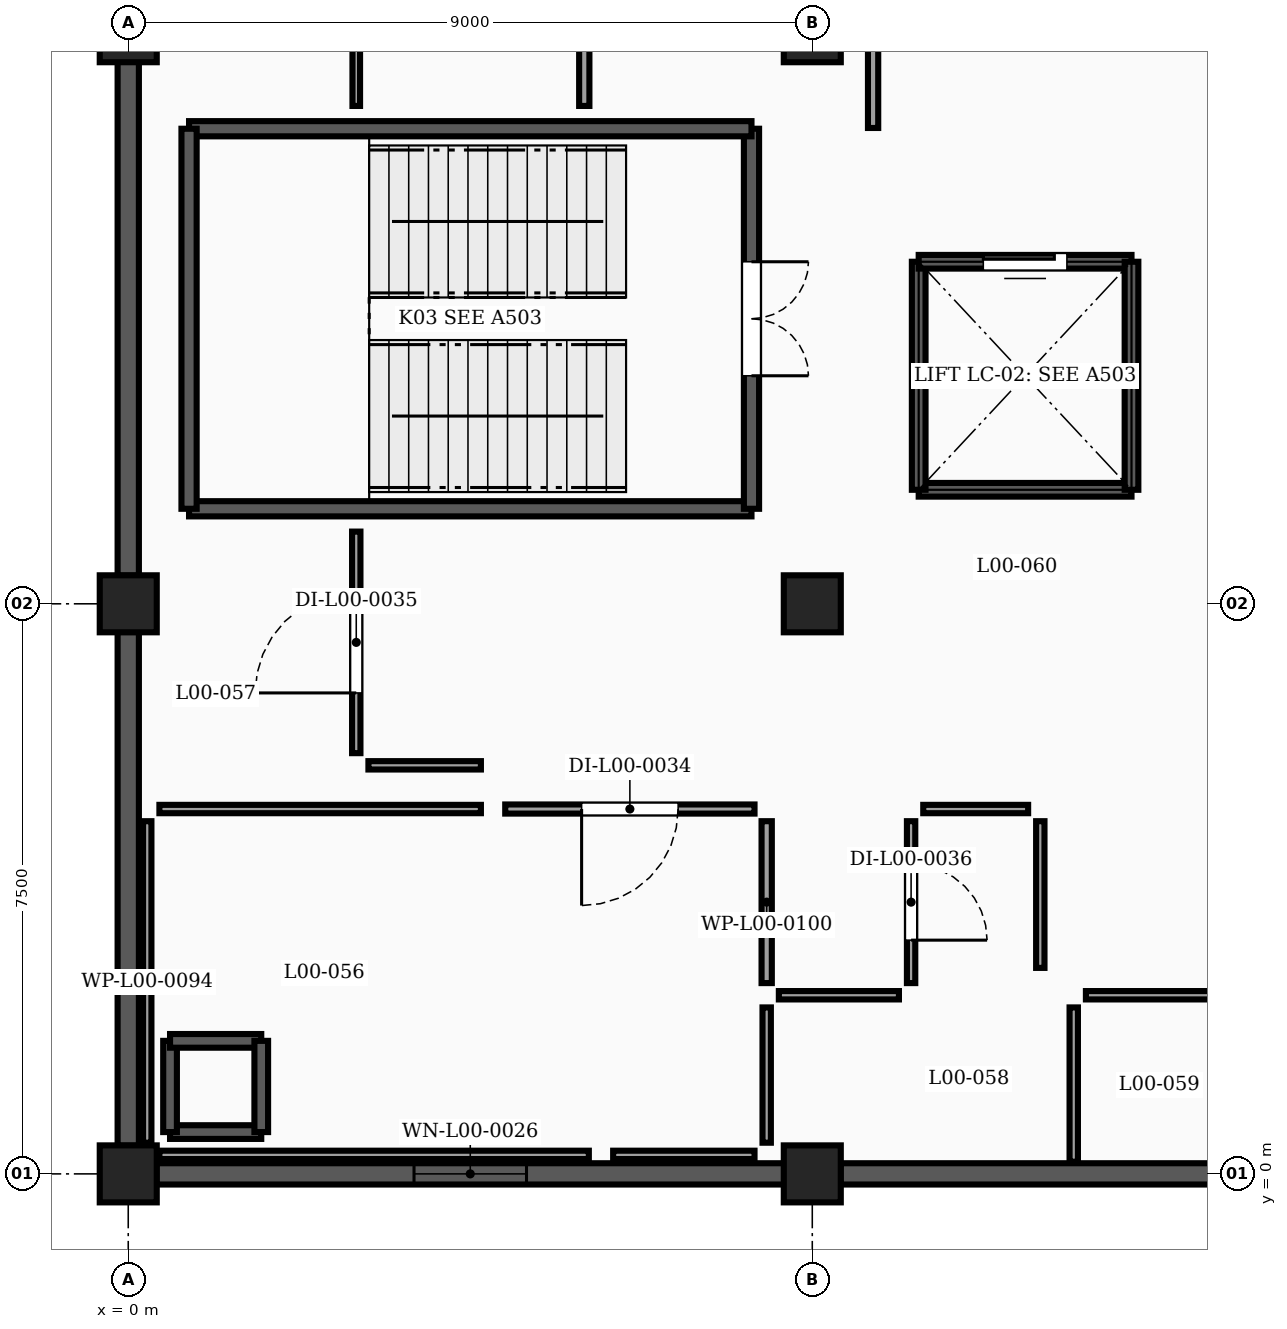
"""IFC4 building model, lengths in metres.
Left out: names, types, materials, properties, quantities, classifications, styles, units other than length and angle.
Written with IfcOpenShell. Run it as: python <this file> out.ifc"""

import sys

from ifc_helpers import new_model, si_unit, direction, frame, frame_2d, origin, origin_2d, place, context, subcontext, project, spatial, rectangle, extrude, element, fill, save


model = new_model("IFC4")
c1 = context("Model", 3, precision=1e-05, world=origin(), true_north=direction((0.0, 1.0)))
c2 = subcontext(c1, "Body", "Model", "MODEL_VIEW")
j1 = project(units=[si_unit("LENGTHUNIT", "METRE"), si_unit("PLANEANGLEUNIT", "RADIAN")], contexts=[c1])
p1 = place(None, origin())
s1 = spatial("IfcSite", under=j1, at=p1, CompositionType="ELEMENT")
p2 = place(p1, origin())
s2 = spatial("IfcBuilding", under=s1, at=p2, CompositionType="ELEMENT")
p3 = place(p2, origin())
s3 = spatial("IfcBuildingStorey", under=s2, at=p3, CompositionType="ELEMENT", Elevation=0.0)
for number, where, z_axis, x_axis in (
    (1, (0.0, 0.0, -0.25), (0.0, 0.0, 1.0), (1.0, 0.0, 0.0)),
    (2, (9.0, 0.0, -0.25), (0.0, 0.0, 1.0), (1.0, 0.0, 0.0)),
    (3, (0.0, 7.5, -0.25), (0.0, 0.0, 1.0), (1.0, 0.0, 0.0)),
    (4, (9.0, 7.5, -0.25), (0.0, 0.0, 1.0), (1.0, 0.0, 0.0)),
    (5, (0.0, 15.0, -0.25), (0.0, 0.0, 1.0), (1.0, 0.0, 0.0)),
    (6, (9.0, 15.0, -0.25), (0.0, 0.0, 1.0), (1.0, 0.0, 0.0)),
):
    element("IfcColumn", number, at=place(p3, frame(where, z_axis=z_axis, x_axis=x_axis)), inside=s3, PredefinedType="COLUMN", context=c2, shape_type="SweptSolid", body=[
        extrude(rectangle(XDim=0.75, YDim=0.75, at=origin_2d()), origin(), (0.0, 0.0, 1.0), 4.75),
    ])
p4 = place(p3, frame((17.629, 0.0, 0.0), z_axis=(0.0, 0.0, 1.0), x_axis=(-1.0, 0.0, 0.0)))
e7 = element("IfcWall", 7, at=p4, inside=s3, PredefinedType="SOLIDWALL", context=c2, shape_type="SweptSolid", body=[
    extrude(rectangle(XDim=8.258, YDim=0.28, at=frame_2d((4.129, 0.0))), origin(), (0.0, 0.0, 1.0), 3.332),
])
p5 = place(p3, frame((8.629, 0.0, 0.0), z_axis=(0.0, 0.0, 1.0), x_axis=(-1.0, 0.0, 0.0)))
e8 = element("IfcWall", 8, at=p5, inside=s3, PredefinedType="SOLIDWALL", context=c2, shape_type="SweptSolid", body=[
    extrude(rectangle(XDim=8.258, YDim=0.28, at=frame_2d((4.129, 0.0))), origin(), (0.0, 0.0, 1.0), 3.332),
])
p6 = place(p5, frame((3.389, 0.0, 0.95)))
e9 = element("IfcOpeningElement", 9, at=p6, cuts=e8, PredefinedType="OPENING", context=c2, shape_type="SweptSolid", body=[
    extrude(rectangle(XDim=1.48, YDim=1.52, at=frame_2d((0.74, 0.76))), frame((0.0, 0.15, 0.0), z_axis=(0.0, -1.0, 0.0), x_axis=(1.0, 0.0, 0.0)), (0.0, 0.0, 1.0), 0.3),
])
for number, where, z_axis, x_axis in (
    (10, (0.0, 0.371, 0.0), (0.0, 0.0, 1.0), (0.0, 1.0, 0.0)),
    (11, (0.0, 7.871, 0.0), (0.0, 0.0, 1.0), (0.0, 1.0, 0.0)),
):
    element("IfcWall", number, at=place(p3, frame(where, z_axis=z_axis, x_axis=x_axis)), inside=s3, PredefinedType="SOLIDWALL", context=c2, shape_type="SweptSolid", body=[
        extrude(rectangle(XDim=6.758, YDim=0.28, at=frame_2d((3.379, 0.0))), origin(), (0.0, 0.0, 1.0), 3.332),
    ])
for number, where, z_axis, x_axis in (
    (12, (1.75, 0.55, 0.0), (0.0, 0.0, 1.0), (-1.0, 0.0, 0.0)),
    (13, (0.55, 0.55, 0.0), (0.0, 0.0, 1.0), (0.0, 1.0, 0.0)),
    (14, (0.55, 1.75, 0.0), (0.0, 0.0, 1.0), (1.0, 0.0, 0.0)),
    (15, (1.75, 1.75, 0.0), (0.0, 0.0, 1.0), (0.0, -1.0, 0.0)),
):
    element("IfcWall", number, at=place(p3, frame(where, z_axis=z_axis, x_axis=x_axis)), inside=s3, PredefinedType="SHEAR", context=c2, shape_type="SweptSolid", body=[
        extrude(rectangle(XDim=1.2, YDim=0.18, at=frame_2d((0.6, 0.0))), origin(), (0.0, 0.0, 1.0), 4.09),
    ])
p7 = place(p3, frame((0.8, 8.75, 0.0), z_axis=(0.0, 0.0, 1.0), x_axis=(1.0, 0.0, 0.0)))
e16 = element("IfcWall", 16, at=p7, inside=s3, PredefinedType="SHEAR", context=c2, shape_type="SweptSolid", body=[
    extrude(rectangle(XDim=7.4, YDim=0.2, at=frame_2d((3.7, 0.0))), origin(), (0.0, 0.0, 1.0), 4.09),
])
p8 = place(p3, frame((8.2, 13.75, 0.0), z_axis=(0.0, 0.0, 1.0), x_axis=(0.0, -1.0, 0.0)))
e17 = element("IfcWall", 17, at=p8, inside=s3, PredefinedType="SHEAR", context=c2, shape_type="SweptSolid", body=[
    extrude(rectangle(XDim=5.0, YDim=0.2, at=frame_2d((2.5, 0.0))), origin(), (0.0, 0.0, 1.0), 4.09),
])
p9 = place(p8, frame((1.75, 0.0, 0.0)))
e18 = element("IfcOpeningElement", 18, at=p9, cuts=e17, PredefinedType="OPENING", context=c2, shape_type="SweptSolid", body=[
    extrude(rectangle(XDim=1.5, YDim=2.15, at=frame_2d((0.75, 1.075))), frame((0.0, 0.11, 0.0), z_axis=(0.0, -1.0, 0.0), x_axis=(1.0, 0.0, 0.0)), (0.0, 0.0, 1.0), 0.22),
])
p10 = place(p3, frame((8.2, 13.75, 0.0), z_axis=(0.0, 0.0, 1.0), x_axis=(-1.0, 0.0, 0.0)))
e19 = element("IfcWall", 19, at=p10, inside=s3, PredefinedType="SHEAR", context=c2, shape_type="SweptSolid", body=[
    extrude(rectangle(XDim=7.4, YDim=0.2, at=frame_2d((3.7, 0.0))), origin(), (0.0, 0.0, 1.0), 4.09),
])
p11 = place(p3, frame((0.8, 13.75, 0.0), z_axis=(0.0, 0.0, 1.0), x_axis=(0.0, -1.0, 0.0)))
e20 = element("IfcWall", 20, at=p11, inside=s3, PredefinedType="SHEAR", context=c2, shape_type="SweptSolid", body=[
    extrude(rectangle(XDim=5.0, YDim=0.2, at=frame_2d((2.5, 0.0))), origin(), (0.0, 0.0, 1.0), 4.09),
])
p12 = place(p3, frame((13.2, 9.0, -0.2), z_axis=(0.0, 0.0, 1.0), x_axis=(-1.0, 0.0, 0.0)))
e21 = element("IfcWall", 21, at=p12, inside=s3, PredefinedType="SHEAR", context=c2, shape_type="SweptSolid", body=[
    extrude(rectangle(XDim=2.8, YDim=0.18, at=frame_2d((1.4, 0.0))), origin(), (0.0, 0.0, 1.0), 4.29),
])
p13 = place(p3, frame((10.4, 9.0, -0.2), z_axis=(0.0, 0.0, 1.0), x_axis=(0.0, 1.0, 0.0)))
e22 = element("IfcWall", 22, at=p13, inside=s3, PredefinedType="SHEAR", context=c2, shape_type="SweptSolid", body=[
    extrude(rectangle(XDim=3.0, YDim=0.18, at=frame_2d((1.5, 0.0))), origin(), (0.0, 0.0, 1.0), 4.29),
])
p14 = place(p3, frame((10.4, 12.0, -0.2), z_axis=(0.0, 0.0, 1.0), x_axis=(1.0, 0.0, 0.0)))
e23 = element("IfcWall", 23, at=p14, inside=s3, PredefinedType="SHEAR", context=c2, shape_type="SweptSolid", body=[
    extrude(rectangle(XDim=2.8, YDim=0.18, at=frame_2d((1.4, 0.0))), origin(), (0.0, 0.0, 1.0), 4.29),
])
p15 = place(p14, frame((0.85, 0.0, 0.2)))
e24 = element("IfcOpeningElement", 24, at=p15, cuts=e23, PredefinedType="OPENING", context=c2, shape_type="SweptSolid", body=[
    extrude(rectangle(XDim=1.1, YDim=2.15, at=frame_2d((0.55, 1.075))), frame((0.0, 0.1, 0.0), z_axis=(0.0, -1.0, 0.0), x_axis=(1.0, 0.0, 0.0)), (0.0, 0.0, 1.0), 0.2),
])
p16 = place(p3, frame((13.2, 12.0, -0.2), z_axis=(0.0, 0.0, 1.0), x_axis=(0.0, -1.0, 0.0)))
e25 = element("IfcWall", 25, at=p16, inside=s3, PredefinedType="SHEAR", context=c2, shape_type="SweptSolid", body=[
    extrude(rectangle(XDim=3.0, YDim=0.18, at=frame_2d((1.5, 0.0))), origin(), (0.0, 0.0, 1.0), 4.29),
])
p17 = place(p3, frame((0.25, 4.64, 0.0), z_axis=(0.0, 0.0, 1.0), x_axis=(0.0, -1.0, 0.0)))
e26 = element("IfcWall", 26, at=p17, inside=s3, PredefinedType="PARTITIONING", context=c2, shape_type="SweptSolid", body=[
    extrude(rectangle(XDim=4.23, YDim=0.11, at=frame_2d((2.115, 0.0))), origin(), (0.0, 0.0, 1.0), 3.332),
])
p18 = place(p3, frame((4.64, 4.8, 0.0), z_axis=(0.0, 0.0, 1.0), x_axis=(-1.0, 0.0, 0.0)))
e27 = element("IfcWall", 27, at=p18, inside=s3, PredefinedType="PARTITIONING", context=c2, shape_type="SweptSolid", body=[
    extrude(rectangle(XDim=4.23, YDim=0.11, at=frame_2d((2.115, 0.0))), origin(), (0.0, 0.0, 1.0), 4.09),
])
p19 = place(p3, frame((0.41, 0.25, 0.0), z_axis=(0.0, 0.0, 1.0), x_axis=(1.0, 0.0, 0.0)))
e28 = element("IfcWall", 28, at=p19, inside=s3, PredefinedType="PARTITIONING", context=c2, shape_type="SweptSolid", body=[
    extrude(rectangle(XDim=5.65, YDim=0.11, at=frame_2d((2.825, 0.0))), origin(), (0.0, 0.0, 1.0), 3.332),
])
p20 = place(p3, frame((8.4, 0.41, 0.0), z_axis=(0.0, 0.0, 1.0), x_axis=(0.0, 1.0, 0.0)))
e29 = element("IfcWall", 29, at=p20, inside=s3, PredefinedType="PARTITIONING", context=c2, shape_type="SweptSolid", body=[
    extrude(rectangle(XDim=1.78, YDim=0.11, at=frame_2d((0.89, 0.0))), origin(), (0.0, 0.0, 1.0), 4.09),
])
p21 = place(p3, frame((6.38, 0.25, 0.0), z_axis=(0.0, 0.0, 1.0), x_axis=(1.0, 0.0, 0.0)))
e30 = element("IfcWall", 30, at=p21, inside=s3, PredefinedType="PARTITIONING", context=c2, shape_type="SweptSolid", body=[
    extrude(rectangle(XDim=1.86, YDim=0.11, at=frame_2d((0.93, 0.0))), origin(), (0.0, 0.0, 1.0), 3.332),
])
p22 = place(p3, frame((8.24, 4.8, 0.0), z_axis=(0.0, 0.0, 1.0), x_axis=(-1.0, 0.0, 0.0)))
e31 = element("IfcWall", 31, at=p22, inside=s3, PredefinedType="PARTITIONING", context=c2, shape_type="SweptSolid", body=[
    extrude(rectangle(XDim=3.28, YDim=0.12, at=frame_2d((1.64, 0.0))), origin(), (0.0, 0.0, 1.0), 4.09),
])
p23 = place(p22, frame((1.005, 0.0, 0.0)))
e32 = element("IfcOpeningElement", 32, at=p23, cuts=e31, PredefinedType="OPENING", context=c2, shape_type="SweptSolid", body=[
    extrude(rectangle(XDim=1.27, YDim=2.16, at=frame_2d((0.635, 1.08))), frame((0.0, 0.07, 0.0), z_axis=(0.0, -1.0, 0.0), x_axis=(1.0, 0.0, 0.0)), (0.0, 0.0, 1.0), 0.14),
])
p24 = place(p3, frame((8.4, 2.51, 0.0), z_axis=(0.0, 0.0, 1.0), x_axis=(0.0, 1.0, 0.0)))
e33 = element("IfcWall", 33, at=p24, inside=s3, PredefinedType="PARTITIONING", context=c2, shape_type="SweptSolid", body=[
    extrude(rectangle(XDim=2.13, YDim=0.135, at=frame_2d((1.065, 0.0))), origin(), (0.0, 0.0, 1.0), 4.09),
])
p25 = place(p3, frame((3.0, 5.535, 0.0), z_axis=(0.0, 0.0, 1.0), x_axis=(0.0, 1.0, 0.0)))
e34 = element("IfcWall", 34, at=p25, inside=s3, PredefinedType="PARTITIONING", context=c2, shape_type="SweptSolid", body=[
    extrude(rectangle(XDim=2.915, YDim=0.11, at=frame_2d((1.458, 0.0))), origin(), (0.0, 0.0, 1.0), 3.775),
])
p26 = place(p25, frame((0.792, 0.0, 0.0)))
e35 = element("IfcOpeningElement", 35, at=p26, cuts=e34, PredefinedType="OPENING", context=c2, shape_type="SweptSolid", body=[
    extrude(rectangle(XDim=1.33, YDim=2.18, at=frame_2d((0.665, 1.09))), frame((0.0, 0.065, 0.0), z_axis=(0.0, -1.0, 0.0), x_axis=(1.0, 0.0, 0.0)), (0.0, 0.0, 1.0), 0.13),
])
p27 = place(p3, frame((4.64, 5.375, 0.0), z_axis=(0.0, 0.0, 1.0), x_axis=(-1.0, 0.0, 0.0)))
e36 = element("IfcWall", 36, at=p27, inside=s3, PredefinedType="PARTITIONING", context=c2, shape_type="SweptSolid", body=[
    extrude(rectangle(XDim=1.48, YDim=0.11, at=frame_2d((0.74, 0.0))), origin(), (0.0, 0.0, 1.0), 4.09),
])
p28 = place(p3, frame((12.44, 0.16, 0.0), z_axis=(0.0, 0.0, 1.0), x_axis=(0.0, 1.0, 0.0)))
e37 = element("IfcWall", 37, at=p28, inside=s3, PredefinedType="PARTITIONING", context=c2, shape_type="SweptSolid", body=[
    extrude(rectangle(XDim=2.03, YDim=0.11, at=frame_2d((1.015, 0.0))), origin(), (0.0, 0.0, 1.0), 4.09),
])
p29 = place(p3, frame((10.14, 2.35, 0.0), z_axis=(0.0, 0.0, 1.0), x_axis=(-1.0, 0.0, 0.0)))
e38 = element("IfcWall", 38, at=p29, inside=s3, PredefinedType="PARTITIONING", context=c2, shape_type="SweptSolid", body=[
    extrude(rectangle(XDim=1.58, YDim=0.11, at=frame_2d((0.79, 0.0))), origin(), (0.0, 0.0, 1.0), 4.09),
])
p30 = place(p3, frame((10.3, 4.64, 0.0), z_axis=(0.0, 0.0, 1.0), x_axis=(0.0, -1.0, 0.0)))
e39 = element("IfcWall", 39, at=p30, inside=s3, PredefinedType="PARTITIONING", context=c2, shape_type="SweptSolid", body=[
    extrude(rectangle(XDim=2.13, YDim=0.11, at=frame_2d((1.065, 0.0))), origin(), (0.0, 0.0, 1.0), 4.09),
])
p31 = place(p30, frame((0.565, 0.0, 0.0)))
e40 = element("IfcOpeningElement", 40, at=p31, cuts=e39, PredefinedType="OPENING", context=c2, shape_type="SweptSolid", body=[
    extrude(rectangle(XDim=1.0, YDim=2.15, at=frame_2d((0.5, 1.075))), frame((0.0, 0.065, 0.0), z_axis=(0.0, -1.0, 0.0), x_axis=(1.0, 0.0, 0.0)), (0.0, 0.0, 1.0), 0.13),
])
p32 = place(p3, frame((11.84, 4.8, 0.0), z_axis=(0.0, 0.0, 1.0), x_axis=(-1.0, 0.0, 0.0)))
e41 = element("IfcWall", 41, at=p32, inside=s3, PredefinedType="PARTITIONING", context=c2, shape_type="SweptSolid", body=[
    extrude(rectangle(XDim=1.38, YDim=0.11, at=frame_2d((0.69, 0.0))), origin(), (0.0, 0.0, 1.0), 4.09),
])
p33 = place(p3, frame((12.0, 2.71, 0.0), z_axis=(0.0, 0.0, 1.0), x_axis=(0.0, 1.0, 0.0)))
e42 = element("IfcWall", 42, at=p33, inside=s3, PredefinedType="PARTITIONING", context=c2, shape_type="SweptSolid", body=[
    extrude(rectangle(XDim=1.93, YDim=0.11, at=frame_2d((0.965, 0.0))), origin(), (0.0, 0.0, 1.0), 3.775),
])
p34 = place(p3, frame((14.44, 2.35, 0.0), z_axis=(0.0, 0.0, 1.0), x_axis=(-1.0, 0.0, 0.0)))
e43 = element("IfcWall", 43, at=p34, inside=s3, PredefinedType="PARTITIONING", context=c2, shape_type="SweptSolid", body=[
    extrude(rectangle(XDim=1.84, YDim=0.11, at=frame_2d((0.92, 0.0))), origin(), (0.0, 0.0, 1.0), 4.09),
])
p35 = place(p3, frame((9.8, 13.76, 0.0), z_axis=(0.0, 0.0, 1.0), x_axis=(0.0, 1.0, 0.0)))
e44 = element("IfcWall", 44, at=p35, inside=s3, PredefinedType="PARTITIONING", context=c2, shape_type="SweptSolid", body=[
    extrude(rectangle(XDim=10.83, YDim=0.135, at=frame_2d((5.415, 0.0))), origin(), (0.0, 0.0, 1.0), 4.09),
])
p36 = place(p35, frame((4.625, 0.0, 0.0)))
e45 = element("IfcOpeningElement", 45, at=p36, cuts=e44, PredefinedType="OPENING", context=c2, shape_type="SweptSolid", body=[
    extrude(rectangle(XDim=1.58, YDim=2.2, at=frame_2d((0.79, 1.1))), frame((0.0, 0.077, 0.0), z_axis=(0.0, -1.0, 0.0), x_axis=(1.0, 0.0, 0.0)), (0.0, 0.0, 1.0), 0.155),
])
p37 = place(p3, frame((6.0, 24.59, 0.0), z_axis=(0.0, 0.0, 1.0), x_axis=(0.0, -1.0, 0.0)))
e46 = element("IfcWall", 46, at=p37, inside=s3, PredefinedType="PARTITIONING", context=c2, shape_type="SweptSolid", body=[
    extrude(rectangle(XDim=10.54, YDim=0.135, at=frame_2d((5.27, 0.0))), origin(), (0.0, 0.0, 1.0), 3.775),
])
p38 = place(p3, frame((3.0, 14.05, 0.0), z_axis=(0.0, 0.0, 1.0), x_axis=(0.0, 1.0, 0.0)))
e47 = element("IfcWall", 47, at=p38, inside=s3, PredefinedType="PARTITIONING", context=c2, shape_type="SweptSolid", body=[
    extrude(rectangle(XDim=10.54, YDim=0.1, at=frame_2d((5.27, 0.0))), origin(), (0.0, 0.0, 1.0), 3.775),
])
p39 = place(p38, frame((4.45, 0.0, 0.0)))
e48 = element("IfcOpeningElement", 48, at=p39, cuts=e47, PredefinedType="OPENING", context=c2, shape_type="SweptSolid", body=[
    extrude(rectangle(XDim=1.64, YDim=2.2, at=frame_2d((0.82, 1.1))), frame((0.0, 0.06, 0.0), z_axis=(0.0, -1.0, 0.0), x_axis=(1.0, 0.0, 0.0)), (0.0, 0.0, 1.0), 0.12),
])
p40 = place(p6, origin())
e49 = element("IfcWindow", 49, at=p40, inside=s3, PartitioningType="DOUBLE_PANEL_VERTICAL", PredefinedType="WINDOW", context=c2, shape_type="SweptSolid", body=[
    extrude(rectangle(XDim=1.48, YDim=1.52, at=frame_2d((0.74, 0.76))), frame((0.0, 0.03, 0.0), z_axis=(0.0, -1.0, 0.0), x_axis=(1.0, 0.0, 0.0)), (0.0, 0.0, 1.0), 0.06),
])
fill(e9, e49)
p41 = place(p9, origin())
e50 = element("IfcDoor", 50, at=p41, inside=s3, OperationType="DOUBLE_DOOR_SINGLE_SWING", PredefinedType="DOOR", context=c2, shape_type="SweptSolid", body=[
    extrude(rectangle(XDim=1.5, YDim=2.15, at=frame_2d((0.75, 1.075))), frame((0.0, 0.025, 0.0), z_axis=(0.0, -1.0, 0.0), x_axis=(1.0, 0.0, 0.0)), (0.0, 0.0, 1.0), 0.05),
])
fill(e18, e50)
p42 = place(p15, origin())
e51 = element("IfcDoor", 51, at=p42, inside=s3, OperationType="SLIDING_TO_LEFT", PredefinedType="DOOR", context=c2, shape_type="SweptSolid", body=[
    extrude(rectangle(XDim=1.1, YDim=2.15, at=frame_2d((0.55, 1.075))), frame((0.0, 0.025, 0.0), z_axis=(0.0, -1.0, 0.0), x_axis=(1.0, 0.0, 0.0)), (0.0, 0.0, 1.0), 0.05),
])
fill(e24, e51)
p43 = place(p23, origin())
e52 = element("IfcDoor", 52, at=p43, inside=s3, OperationType="SINGLE_SWING_RIGHT", PredefinedType="DOOR", context=c2, shape_type="SweptSolid", body=[
    extrude(rectangle(XDim=1.27, YDim=2.16, at=frame_2d((0.635, 1.08))), frame((0.0, 0.025, 0.0), z_axis=(0.0, -1.0, 0.0), x_axis=(1.0, 0.0, 0.0)), (0.0, 0.0, 1.0), 0.05),
])
fill(e32, e52)
p44 = place(p26, origin())
e53 = element("IfcDoor", 53, at=p44, inside=s3, OperationType="SINGLE_SWING_LEFT", PredefinedType="DOOR", context=c2, shape_type="SweptSolid", body=[
    extrude(rectangle(XDim=1.33, YDim=2.18, at=frame_2d((0.665, 1.09))), frame((0.0, 0.025, 0.0), z_axis=(0.0, -1.0, 0.0), x_axis=(1.0, 0.0, 0.0)), (0.0, 0.0, 1.0), 0.05),
])
fill(e35, e53)
p45 = place(p31, origin())
e54 = element("IfcDoor", 54, at=p45, inside=s3, OperationType="SINGLE_SWING_RIGHT", PredefinedType="DOOR", context=c2, shape_type="SweptSolid", body=[
    extrude(rectangle(XDim=1.0, YDim=2.15, at=frame_2d((0.5, 1.075))), frame((0.0, 0.025, 0.0), z_axis=(0.0, -1.0, 0.0), x_axis=(1.0, 0.0, 0.0)), (0.0, 0.0, 1.0), 0.05),
])
fill(e40, e54)
save(model, sys.argv[1])
